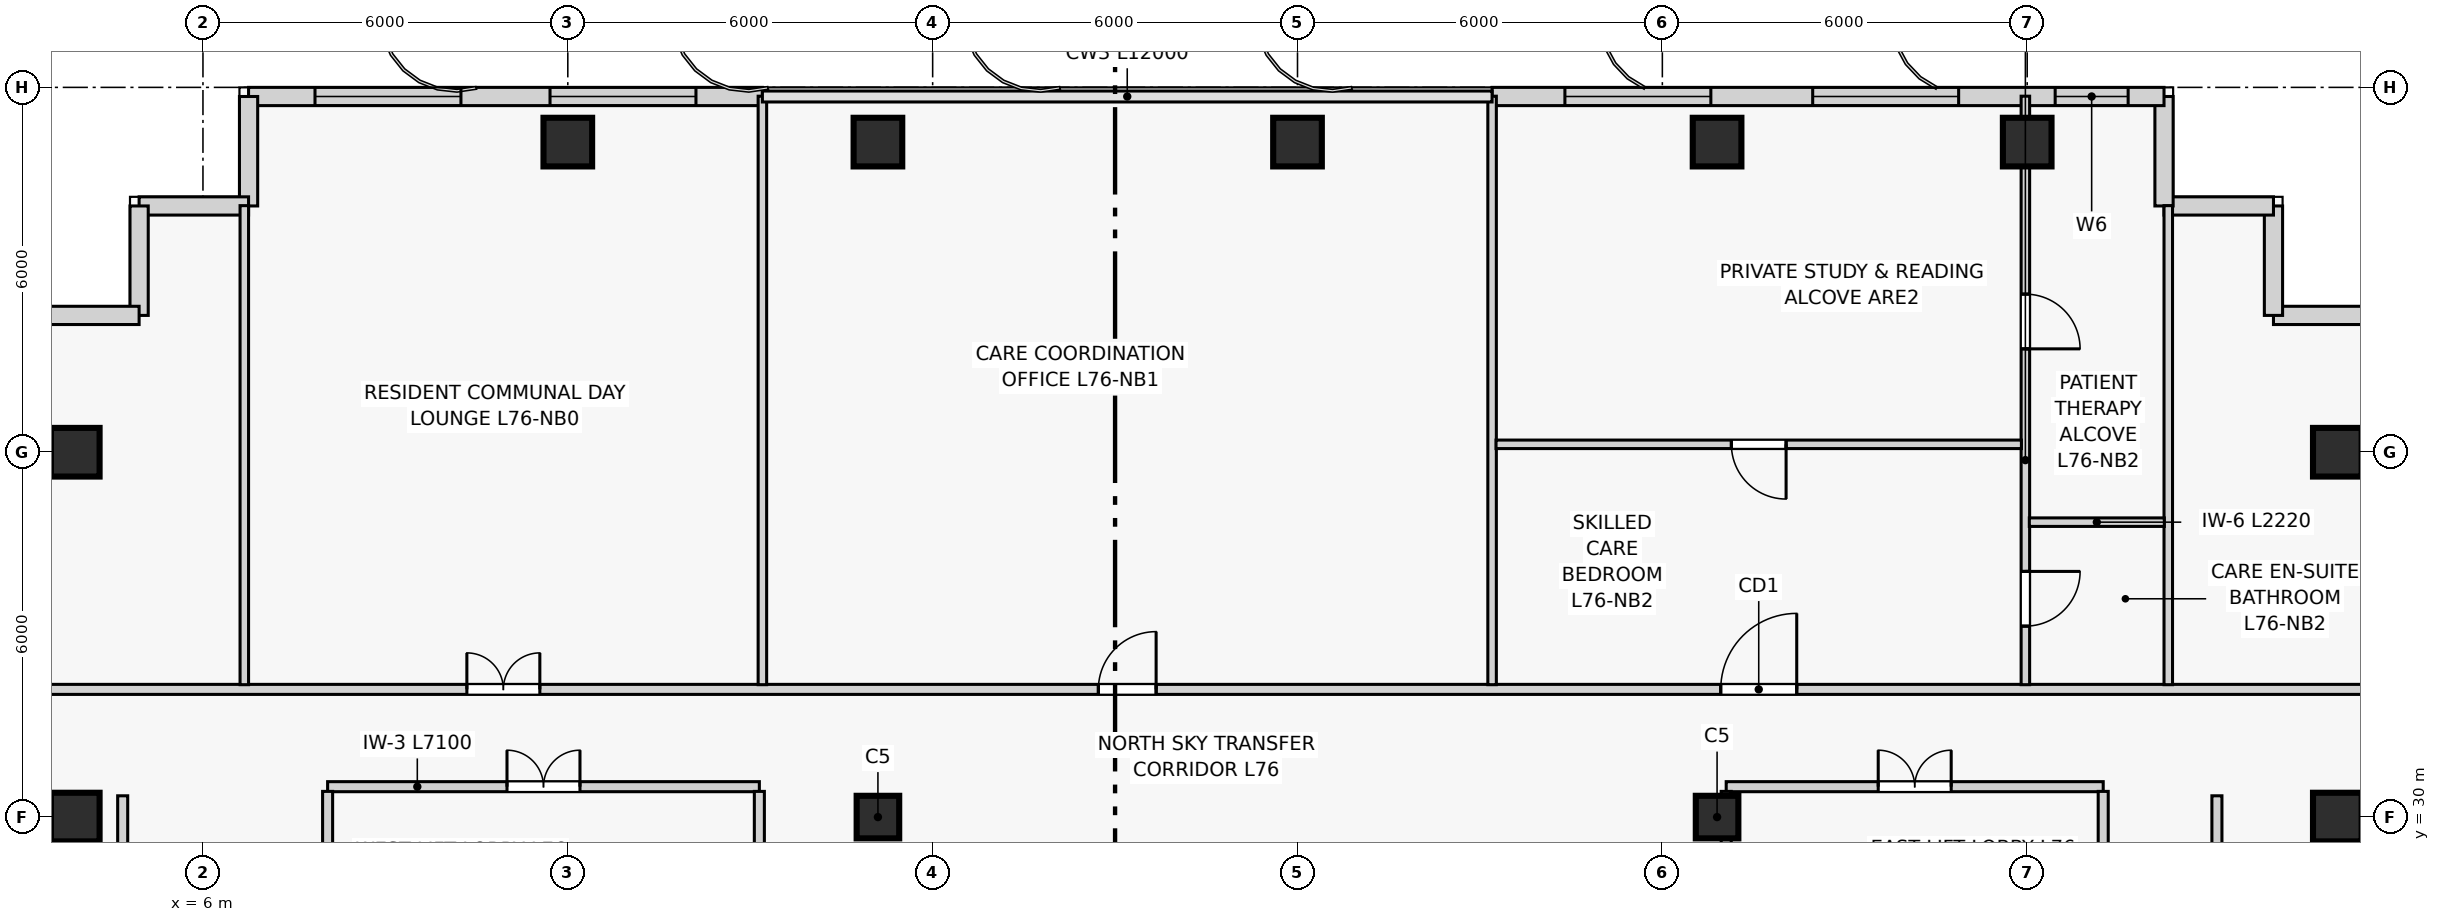
"""IFC4 building model, lengths in metres.
Left out: names, types, materials, properties, quantities, classifications, styles, units other than length and angle.
Written with IfcOpenShell. Run it as: python <this file> out.ifc"""

import sys

from ifc_helpers import new_model, si_unit, direction, frame, frame_2d, origin, origin_2d, place, context, subcontext, project, spatial, rectangle, extrude, source, transform, mapped, element, fill, save


model = new_model("IFC4")
c1 = context("Model", 3, precision=1e-05, world=origin(), true_north=direction((0.0, 1.0)))
c2 = subcontext(c1, "Body", "Model", "MODEL_VIEW")
j1 = project(units=[si_unit("LENGTHUNIT", "METRE"), si_unit("PLANEANGLEUNIT", "RADIAN")], contexts=[c1])
p1 = place(None, origin())
s1 = spatial("IfcSite", under=j1, at=p1, CompositionType="ELEMENT")
p2 = place(p1, origin())
s2 = spatial("IfcBuilding", under=s1, at=p2, CompositionType="ELEMENT")
p3 = place(p2, frame((0.0, 0.0, 289.5)))
s3 = spatial("IfcBuildingStorey", under=s2, at=p3, CompositionType="ELEMENT", Elevation=289.5)
m1 = source(origin(), c2, "Body", "SweptSolid", [
    extrude(rectangle(XDim=0.8, YDim=0.8, at=origin_2d()), origin(), (0.0, 0.0, 1.0), 4.2),
])
for number, where, z_axis, x_axis in (
    (1, (12.0, 41.1, 0.0), (0.0, 0.0, 1.0), (1.0, 0.0, 0.0)),
    (2, (17.1, 41.1, 0.0), (0.0, 0.0, 1.0), (1.0, 0.0, 0.0)),
    (3, (24.0, 41.1, 0.0), (0.0, 0.0, 1.0), (1.0, 0.0, 0.0)),
    (4, (30.9, 41.1, 0.0), (0.0, 0.0, 1.0), (1.0, 0.0, 0.0)),
    (5, (36.0, 41.1, 0.0), (0.0, 0.0, 1.0), (1.0, 0.0, 0.0)),
    (6, (3.9, 30.0, 0.0), (0.0, 0.0, 1.0), (1.0, 0.0, 0.0)),
    (7, (41.1, 30.0, 0.0), (0.0, 0.0, 1.0), (1.0, 0.0, 0.0)),
    (8, (3.9, 36.0, 0.0), (0.0, 0.0, 1.0), (1.0, 0.0, 0.0)),
    (9, (41.1, 36.0, 0.0), (0.0, 0.0, 1.0), (1.0, 0.0, 0.0)),
):
    element("IfcColumn", number, at=place(p3, frame(where, z_axis=z_axis, x_axis=x_axis)), inside=s3, PredefinedType="COLUMN", context=c2, shape_type="MappedRepresentation", body=[
        mapped(m1, transform((0.0, 0.0, 0.0), scale=1.0)),
    ])
m2 = source(origin(), c2, "Body", "SweptSolid", [
    extrude(rectangle(XDim=0.7, YDim=0.7, at=origin_2d()), origin(), (0.0, 0.0, 1.0), 4.2),
])
for number, where, z_axis, x_axis in (
    (10, (17.1, 30.0, 0.0), (0.0, 0.0, 1.0), (1.0, 0.0, 0.0)),
    (11, (30.9, 30.0, 0.0), (0.0, 0.0, 1.0), (1.0, 0.0, 0.0)),
):
    element("IfcColumn", number, at=place(p3, frame(where, z_axis=z_axis, x_axis=x_axis)), inside=s3, PredefinedType="COLUMN", context=c2, shape_type="MappedRepresentation", body=[
        mapped(m2, transform((0.0, 0.0, 0.0), scale=1.0)),
    ])
for number, where, z_axis, x_axis in (
    (12, (41.85, 38.25, 0.0), (0.0, 0.0, 1.0), (-1.0, 0.0, 0.0)),
    (13, (40.05, 38.25, 0.0), (0.0, 0.0, 1.0), (0.0, 1.0, 0.0)),
    (14, (40.05, 40.05, 0.0), (0.0, 0.0, 1.0), (-1.0, 0.0, 0.0)),
    (15, (38.25, 40.05, 0.0), (0.0, 0.0, 1.0), (0.0, 1.0, 0.0)),
):
    element("IfcWall", number, at=place(p3, frame(where, z_axis=z_axis, x_axis=x_axis)), inside=s3, PredefinedType="SOLIDWALL", context=c2, shape_type="SweptSolid", body=[
        extrude(rectangle(XDim=1.8, YDim=0.3, at=frame_2d((0.9, 0.0))), origin(), (0.0, 0.0, 1.0), 3.92),
    ])
p4 = place(p3, frame((38.25, 41.85, 0.0), z_axis=(0.0, 0.0, 1.0), x_axis=(-1.0, 0.0, 0.0)))
e16 = element("IfcWall", 16, at=p4, inside=s3, PredefinedType="SOLIDWALL", context=c2, shape_type="SweptSolid", body=[
    extrude(rectangle(XDim=11.05, YDim=0.3, at=frame_2d((5.525, 0.0))), origin(), (0.0, 0.0, 1.0), 3.92),
])
p5 = place(p4, frame((0.59, 0.0, 0.95)))
e17 = element("IfcOpeningElement", 17, at=p5, cuts=e16, PredefinedType="OPENING", context=c2, shape_type="SweptSolid", body=[
    extrude(rectangle(XDim=1.2, YDim=1.5, at=frame_2d((0.6, 0.75))), frame((0.0, 0.16, 0.0), z_axis=(0.0, -1.0, 0.0), x_axis=(1.0, 0.0, 0.0)), (0.0, 0.0, 1.0), 0.32),
])
p6 = place(p4, frame((3.377, 0.0, 0.8)))
e18 = element("IfcOpeningElement", 18, at=p6, cuts=e16, PredefinedType="OPENING", context=c2, shape_type="SweptSolid", body=[
    extrude(rectangle(XDim=2.4, YDim=2.1, at=frame_2d((1.2, 1.05))), frame((0.0, 0.16, 0.0), z_axis=(0.0, -1.0, 0.0), x_axis=(1.0, 0.0, 0.0)), (0.0, 0.0, 1.0), 0.32),
])
p7 = place(p4, frame((7.452, 0.0, 0.8)))
e19 = element("IfcOpeningElement", 19, at=p7, cuts=e16, PredefinedType="OPENING", context=c2, shape_type="SweptSolid", body=[
    extrude(rectangle(XDim=2.4, YDim=2.1, at=frame_2d((1.2, 1.05))), frame((0.0, 0.16, 0.0), z_axis=(0.0, -1.0, 0.0), x_axis=(1.0, 0.0, 0.0)), (0.0, 0.0, 1.0), 0.32),
])
p8 = place(p3, frame((15.2, 41.85, 0.0), z_axis=(0.0, 0.0, 1.0), x_axis=(-1.0, 0.0, 0.0)))
e20 = element("IfcWall", 20, at=p8, inside=s3, PredefinedType="SOLIDWALL", context=c2, shape_type="SweptSolid", body=[
    extrude(rectangle(XDim=8.45, YDim=0.3, at=frame_2d((4.225, 0.0))), origin(), (0.0, 0.0, 1.0), 3.92),
])
p9 = place(p8, frame((1.093, 0.0, 0.8)))
e21 = element("IfcOpeningElement", 21, at=p9, cuts=e20, PredefinedType="OPENING", context=c2, shape_type="SweptSolid", body=[
    extrude(rectangle(XDim=2.4, YDim=2.1, at=frame_2d((1.2, 1.05))), frame((0.0, 0.16, 0.0), z_axis=(0.0, -1.0, 0.0), x_axis=(1.0, 0.0, 0.0)), (0.0, 0.0, 1.0), 0.32),
])
p10 = place(p8, frame((4.958, 0.0, 0.8)))
e22 = element("IfcOpeningElement", 22, at=p10, cuts=e20, PredefinedType="OPENING", context=c2, shape_type="SweptSolid", body=[
    extrude(rectangle(XDim=2.4, YDim=2.1, at=frame_2d((1.2, 1.05))), frame((0.0, 0.16, 0.0), z_axis=(0.0, -1.0, 0.0), x_axis=(1.0, 0.0, 0.0)), (0.0, 0.0, 1.0), 0.32),
])
for number, where, z_axis, x_axis in (
    (23, (6.75, 41.85, 0.0), (0.0, 0.0, 1.0), (0.0, -1.0, 0.0)),
    (24, (6.75, 40.05, 0.0), (0.0, 0.0, 1.0), (-1.0, 0.0, 0.0)),
    (25, (4.95, 40.05, 0.0), (0.0, 0.0, 1.0), (0.0, -1.0, 0.0)),
    (26, (4.95, 38.25, 0.0), (0.0, 0.0, 1.0), (-1.0, 0.0, 0.0)),
):
    element("IfcWall", number, at=place(p3, frame(where, z_axis=z_axis, x_axis=x_axis)), inside=s3, PredefinedType="SOLIDWALL", context=c2, shape_type="SweptSolid", body=[
        extrude(rectangle(XDim=1.8, YDim=0.3, at=frame_2d((0.9, 0.0))), origin(), (0.0, 0.0, 1.0), 3.92),
    ])
p11 = place(p3, frame((8.05, 30.5, 0.0), z_axis=(0.0, 0.0, 1.0), x_axis=(1.0, 0.0, 0.0)))
e27 = element("IfcWall", 27, at=p11, inside=s3, PredefinedType="PARTITIONING", context=c2, shape_type="SweptSolid", body=[
    extrude(rectangle(XDim=7.1, YDim=0.165, at=frame_2d((3.55, 0.0))), origin(), (0.0, 0.0, 1.0), 3.92),
])
p12 = place(p11, frame((2.95, 0.0, 0.0)))
e28 = element("IfcOpeningElement", 28, at=p12, cuts=e27, PredefinedType="OPENING", context=c2, shape_type="SweptSolid", body=[
    extrude(rectangle(XDim=1.2, YDim=2.2, at=frame_2d((0.6, 1.1))), frame((0.0, 0.093, 0.0), z_axis=(0.0, -1.0, 0.0), x_axis=(1.0, 0.0, 0.0)), (0.0, 0.0, 1.0), 0.185),
])
for number, where, z_axis, x_axis in (
    (29, (8.05, 27.27, 0.0), (0.0, 0.0, 1.0), (0.0, 1.0, 0.0)),
    (30, (15.15, 27.27, 0.0), (0.0, 0.0, 1.0), (0.0, 1.0, 0.0)),
):
    element("IfcWall", number, at=place(p3, frame(where, z_axis=z_axis, x_axis=x_axis)), inside=s3, PredefinedType="PARTITIONING", context=c2, shape_type="SweptSolid", body=[
        extrude(rectangle(XDim=3.153, YDim=0.165, at=frame_2d((1.576, 0.0))), origin(), (0.0, 0.0, 1.0), 3.92),
    ])
p13 = place(p3, frame((31.05, 30.5, 0.0), z_axis=(0.0, 0.0, 1.0), x_axis=(1.0, 0.0, 0.0)))
e31 = element("IfcWall", 31, at=p13, inside=s3, PredefinedType="PARTITIONING", context=c2, shape_type="SweptSolid", body=[
    extrude(rectangle(XDim=6.2, YDim=0.165, at=frame_2d((3.1, 0.0))), origin(), (0.0, 0.0, 1.0), 3.92),
])
p14 = place(p13, frame((2.5, 0.0, 0.0)))
e32 = element("IfcOpeningElement", 32, at=p14, cuts=e31, PredefinedType="OPENING", context=c2, shape_type="SweptSolid", body=[
    extrude(rectangle(XDim=1.2, YDim=2.2, at=frame_2d((0.6, 1.1))), frame((0.0, 0.093, 0.0), z_axis=(0.0, -1.0, 0.0), x_axis=(1.0, 0.0, 0.0)), (0.0, 0.0, 1.0), 0.185),
])
for number, where, z_axis, x_axis in (
    (33, (31.05, 27.27, 0.0), (0.0, 0.0, 1.0), (0.0, 1.0, 0.0)),
    (34, (37.25, 27.27, 0.0), (0.0, 0.0, 1.0), (0.0, 1.0, 0.0)),
):
    element("IfcWall", number, at=place(p3, frame(where, z_axis=z_axis, x_axis=x_axis)), inside=s3, PredefinedType="PARTITIONING", context=c2, shape_type="SweptSolid", body=[
        extrude(rectangle(XDim=3.153, YDim=0.165, at=frame_2d((1.576, 0.0))), origin(), (0.0, 0.0, 1.0), 3.92),
    ])
p15 = place(p3, frame((3.145, 32.1, 0.0), z_axis=(0.0, 0.0, 1.0), x_axis=(1.0, 0.0, 0.0)))
e35 = element("IfcWall", 35, at=p15, inside=s3, PredefinedType="PARTITIONING", context=c2, shape_type="SweptSolid", body=[
    extrude(rectangle(XDim=38.71, YDim=0.165, at=frame_2d((19.355, 0.0))), origin(), (0.0, 0.0, 1.0), 3.92),
])
p16 = place(p15, frame((7.195, 0.0, 0.0)))
e36 = element("IfcOpeningElement", 36, at=p16, cuts=e35, PredefinedType="OPENING", context=c2, shape_type="SweptSolid", body=[
    extrude(rectangle(XDim=1.2, YDim=2.2, at=frame_2d((0.6, 1.1))), frame((0.0, 0.093, 0.0), z_axis=(0.0, -1.0, 0.0), x_axis=(1.0, 0.0, 0.0)), (0.0, 0.0, 1.0), 0.185),
])
p17 = place(p15, frame((17.58, 0.0, 0.0)))
e37 = element("IfcOpeningElement", 37, at=p17, cuts=e35, PredefinedType="OPENING", context=c2, shape_type="SweptSolid", body=[
    extrude(rectangle(XDim=0.95, YDim=2.1, at=frame_2d((0.475, 1.05))), frame((0.0, 0.093, 0.0), z_axis=(0.0, -1.0, 0.0), x_axis=(1.0, 0.0, 0.0)), (0.0, 0.0, 1.0), 0.185),
])
p18 = place(p15, frame((27.815, 0.0, 0.0)))
e38 = element("IfcOpeningElement", 38, at=p18, cuts=e35, PredefinedType="OPENING", context=c2, shape_type="SweptSolid", body=[
    extrude(rectangle(XDim=1.25, YDim=2.2, at=frame_2d((0.625, 1.1))), frame((0.0, 0.093, 0.0), z_axis=(0.0, -1.0, 0.0), x_axis=(1.0, 0.0, 0.0)), (0.0, 0.0, 1.0), 0.185),
])
p19 = place(p3, frame((4.68, 26.45, 0.0), z_axis=(0.0, 0.0, 1.0), x_axis=(0.0, 1.0, 0.0)))
e39 = element("IfcWall", 39, at=p19, inside=s3, PredefinedType="PARTITIONING", context=c2, shape_type="SweptSolid", body=[
    extrude(rectangle(XDim=3.9, YDim=0.165, at=frame_2d((1.95, 0.0))), origin(), (0.0, 0.0, 1.0), 3.92),
])
p20 = place(p19, frame((1.475, 0.0, 0.0)))
e40 = element("IfcOpeningElement", 40, at=p20, cuts=e39, PredefinedType="OPENING", context=c2, shape_type="SweptSolid", body=[
    extrude(rectangle(XDim=0.95, YDim=2.1, at=frame_2d((0.475, 1.05))), frame((0.0, 0.093, 0.0), z_axis=(0.0, -1.0, 0.0), x_axis=(1.0, 0.0, 0.0)), (0.0, 0.0, 1.0), 0.185),
])
p21 = place(p3, frame((39.12, 11.45, 0.0), z_axis=(0.0, 0.0, 1.0), x_axis=(0.0, 1.0, 0.0)))
e41 = element("IfcWall", 41, at=p21, inside=s3, PredefinedType="PARTITIONING", context=c2, shape_type="SweptSolid", body=[
    extrude(rectangle(XDim=18.9, YDim=0.165, at=frame_2d((9.45, 0.0))), origin(), (0.0, 0.0, 1.0), 3.92),
])
p22 = place(p21, frame((2.05, 0.0, 0.0)))
e42 = element("IfcOpeningElement", 42, at=p22, cuts=e41, PredefinedType="OPENING", context=c2, shape_type="SweptSolid", body=[
    extrude(rectangle(XDim=0.95, YDim=2.1, at=frame_2d((0.475, 1.05))), frame((0.0, 0.093, 0.0), z_axis=(0.0, -1.0, 0.0), x_axis=(1.0, 0.0, 0.0)), (0.0, 0.0, 1.0), 0.185),
])
p23 = place(p3, frame((6.68, 32.177, 0.0), z_axis=(0.0, 0.0, 1.0), x_axis=(0.0, 1.0, 0.0)))
e43 = element("IfcWall", 43, at=p23, inside=s3, PredefinedType="PARTITIONING", context=c2, shape_type="SweptSolid", body=[
    extrude(rectangle(XDim=7.877, YDim=0.14, at=frame_2d((3.939, 0.0))), origin(), (0.0, 0.0, 1.0), 3.92),
])
for number, where, z_axis, x_axis in (
    (44, (15.2, 32.177, 0.0), (0.0, 0.0, 1.0), (0.0, 1.0, 0.0)),
    (45, (27.2, 32.177, 0.0), (0.0, 0.0, 1.0), (0.0, 1.0, 0.0)),
):
    element("IfcWall", number, at=place(p3, frame(where, z_axis=z_axis, x_axis=x_axis)), inside=s3, PredefinedType="PARTITIONING", context=c2, shape_type="SweptSolid", body=[
        extrude(rectangle(XDim=9.677, YDim=0.14, at=frame_2d((4.839, 0.0))), origin(), (0.0, 0.0, 1.0), 3.92),
    ])
p24 = place(p3, frame((38.32, 32.177, 0.0), z_axis=(0.0, 0.0, 1.0), x_axis=(0.0, 1.0, 0.0)))
e46 = element("IfcWall", 46, at=p24, inside=s3, PredefinedType="PARTITIONING", context=c2, shape_type="SweptSolid", body=[
    extrude(rectangle(XDim=7.877, YDim=0.14, at=frame_2d((3.939, 0.0))), origin(), (0.0, 0.0, 1.0), 3.92),
])
p25 = place(p3, frame((35.97, 32.177, 0.0), z_axis=(0.0, 0.0, 1.0), x_axis=(0.0, 1.0, 0.0)))
e47 = element("IfcWall", 47, at=p25, inside=s3, PredefinedType="PLUMBINGWALL", context=c2, shape_type="SweptSolid", body=[
    extrude(rectangle(XDim=9.677, YDim=0.14, at=frame_2d((4.839, 0.0))), origin(), (0.0, 0.0, 1.0), 3.07),
])
p26 = place(p25, frame((0.962, 0.0, 0.0)))
e48 = element("IfcOpeningElement", 48, at=p26, cuts=e47, PredefinedType="OPENING", context=c2, shape_type="SweptSolid", body=[
    extrude(rectangle(XDim=0.9, YDim=2.1, at=frame_2d((0.45, 1.05))), frame((0.0, 0.08, 0.0), z_axis=(0.0, -1.0, 0.0), x_axis=(1.0, 0.0, 0.0)), (0.0, 0.0, 1.0), 0.16),
])
p27 = place(p25, frame((5.522, 0.0, 0.0)))
e49 = element("IfcOpeningElement", 49, at=p27, cuts=e47, PredefinedType="OPENING", context=c2, shape_type="SweptSolid", body=[
    extrude(rectangle(XDim=0.9, YDim=2.1, at=frame_2d((0.45, 1.05))), frame((0.0, 0.08, 0.0), z_axis=(0.0, -1.0, 0.0), x_axis=(1.0, 0.0, 0.0)), (0.0, 0.0, 1.0), 0.16),
])
p28 = place(p3, frame((36.035, 34.85, 0.0), z_axis=(0.0, 0.0, 1.0), x_axis=(1.0, 0.0, 0.0)))
e50 = element("IfcWall", 50, at=p28, inside=s3, PredefinedType="PLUMBINGWALL", context=c2, shape_type="SweptSolid", body=[
    extrude(rectangle(XDim=2.22, YDim=0.14, at=frame_2d((1.11, 0.0))), origin(), (0.0, 0.0, 1.0), 3.92),
])
p29 = place(p3, frame((27.265, 36.13, 0.0), z_axis=(0.0, 0.0, 1.0), x_axis=(1.0, 0.0, 0.0)))
e51 = element("IfcWall", 51, at=p29, inside=s3, PredefinedType="PARTITIONING", context=c2, shape_type="SweptSolid", body=[
    extrude(rectangle(XDim=8.64, YDim=0.14, at=frame_2d((4.32, 0.0))), origin(), (0.0, 0.0, 1.0), 3.52),
])
p30 = place(p29, frame((3.87, 0.0, 0.0)))
e52 = element("IfcOpeningElement", 52, at=p30, cuts=e51, PredefinedType="OPENING", context=c2, shape_type="SweptSolid", body=[
    extrude(rectangle(XDim=0.9, YDim=2.1, at=frame_2d((0.45, 1.05))), frame((0.0, 0.08, 0.0), z_axis=(0.0, -1.0, 0.0), x_axis=(1.0, 0.0, 0.0)), (0.0, 0.0, 1.0), 0.16),
])
m3 = source(origin(), c2, "Body", "SweptSolid", [
    extrude(rectangle(XDim=1.2, YDim=1.5, at=frame_2d((0.6, 0.75))), frame((0.0, 0.03, 0.0), z_axis=(0.0, -1.0, 0.0), x_axis=(1.0, 0.0, 0.0)), (0.0, 0.0, 1.0), 0.06),
])
p31 = place(p5, origin())
e53 = element("IfcWindow", 53, at=p31, inside=s3, PartitioningType="SINGLE_PANEL", PredefinedType="WINDOW", context=c2, shape_type="MappedRepresentation", body=[
    mapped(m3, transform((0.0, 0.0, 0.0), scale=1.0)),
])
fill(e17, e53)
m4 = source(origin(), c2, "Body", "SweptSolid", [
    extrude(rectangle(XDim=2.4, YDim=2.1, at=frame_2d((1.2, 1.05))), frame((0.0, 0.03, 0.0), z_axis=(0.0, -1.0, 0.0), x_axis=(1.0, 0.0, 0.0)), (0.0, 0.0, 1.0), 0.06),
])
p32 = place(p6, origin())
e54 = element("IfcWindow", 54, at=p32, inside=s3, PartitioningType="SINGLE_PANEL", PredefinedType="WINDOW", context=c2, shape_type="MappedRepresentation", body=[
    mapped(m4, transform((0.0, 0.0, 0.0), scale=1.0)),
])
fill(e18, e54)
p33 = place(p7, origin())
e55 = element("IfcWindow", 55, at=p33, inside=s3, PartitioningType="SINGLE_PANEL", PredefinedType="WINDOW", context=c2, shape_type="MappedRepresentation", body=[
    mapped(m4, transform((0.0, 0.0, 0.0), scale=1.0)),
])
fill(e19, e55)
p34 = place(p9, origin())
e56 = element("IfcWindow", 56, at=p34, inside=s3, PartitioningType="SINGLE_PANEL", PredefinedType="WINDOW", context=c2, shape_type="MappedRepresentation", body=[
    mapped(m4, transform((0.0, 0.0, 0.0), scale=1.0)),
])
fill(e21, e56)
p35 = place(p10, origin())
e57 = element("IfcWindow", 57, at=p35, inside=s3, PartitioningType="SINGLE_PANEL", PredefinedType="WINDOW", context=c2, shape_type="MappedRepresentation", body=[
    mapped(m4, transform((0.0, 0.0, 0.0), scale=1.0)),
])
fill(e22, e57)
m5 = source(origin(), c2, "Body", "SweptSolid", [
    extrude(rectangle(XDim=1.2, YDim=2.2, at=frame_2d((0.6, 1.1))), frame((0.0, 0.025, 0.0), z_axis=(0.0, -1.0, 0.0), x_axis=(1.0, 0.0, 0.0)), (0.0, 0.0, 1.0), 0.05),
])
p36 = place(p12, origin())
e58 = element("IfcDoor", 58, at=p36, inside=s3, OperationType="DOUBLE_DOOR_SINGLE_SWING", PredefinedType="DOOR", context=c2, shape_type="MappedRepresentation", body=[
    mapped(m5, transform((0.0, 0.0, 0.0), scale=1.0)),
])
fill(e28, e58)
p37 = place(p14, origin())
e59 = element("IfcDoor", 59, at=p37, inside=s3, OperationType="DOUBLE_DOOR_SINGLE_SWING", PredefinedType="DOOR", context=c2, shape_type="MappedRepresentation", body=[
    mapped(m5, transform((0.0, 0.0, 0.0), scale=1.0)),
])
fill(e32, e59)
p38 = place(p16, origin())
e60 = element("IfcDoor", 60, at=p38, inside=s3, OperationType="DOUBLE_DOOR_SINGLE_SWING", PredefinedType="DOOR", context=c2, shape_type="MappedRepresentation", body=[
    mapped(m5, transform((0.0, 0.0, 0.0), scale=1.0)),
])
fill(e36, e60)
m6 = source(origin(), c2, "Body", "SweptSolid", [
    extrude(rectangle(XDim=0.95, YDim=2.1, at=frame_2d((0.475, 1.05))), frame((0.0, 0.025, 0.0), z_axis=(0.0, -1.0, 0.0), x_axis=(1.0, 0.0, 0.0)), (0.0, 0.0, 1.0), 0.05),
])
p39 = place(p17, origin())
e61 = element("IfcDoor", 61, at=p39, inside=s3, OperationType="SINGLE_SWING_RIGHT", PredefinedType="DOOR", context=c2, shape_type="MappedRepresentation", body=[
    mapped(m6, transform((0.0, 0.0, 0.0), scale=1.0)),
])
fill(e37, e61)
m7 = source(origin(), c2, "Body", "SweptSolid", [
    extrude(rectangle(XDim=1.25, YDim=2.2, at=frame_2d((0.625, 1.1))), frame((0.0, 0.025, 0.0), z_axis=(0.0, -1.0, 0.0), x_axis=(1.0, 0.0, 0.0)), (0.0, 0.0, 1.0), 0.05),
])
p40 = place(p18, origin())
e62 = element("IfcDoor", 62, at=p40, inside=s3, OperationType="SINGLE_SWING_RIGHT", PredefinedType="DOOR", context=c2, shape_type="MappedRepresentation", body=[
    mapped(m7, transform((0.0, 0.0, 0.0), scale=1.0)),
])
fill(e38, e62)
m8 = source(origin(), c2, "Body", "SweptSolid", [
    extrude(rectangle(XDim=0.9, YDim=2.1, at=frame_2d((0.45, 1.05))), frame((0.0, 0.025, 0.0), z_axis=(0.0, -1.0, 0.0), x_axis=(1.0, 0.0, 0.0)), (0.0, 0.0, 1.0), 0.05),
])
p41 = place(p26, frame((0.9, 0.0, 0.0), z_axis=(0.0, 0.0, 1.0), x_axis=(-1.0, 0.0, 0.0)))
e63 = element("IfcDoor", 63, at=p41, inside=s3, OperationType="SINGLE_SWING_LEFT", PredefinedType="DOOR", context=c2, shape_type="MappedRepresentation", body=[
    mapped(m8, transform((0.0, 0.0, 0.0), scale=1.0)),
])
fill(e48, e63)
p42 = place(p27, frame((0.9, 0.0, 0.0), z_axis=(0.0, 0.0, 1.0), x_axis=(-1.0, 0.0, 0.0)))
e64 = element("IfcDoor", 64, at=p42, inside=s3, OperationType="SINGLE_SWING_RIGHT", PredefinedType="DOOR", context=c2, shape_type="MappedRepresentation", body=[
    mapped(m8, transform((0.0, 0.0, 0.0), scale=1.0)),
])
fill(e49, e64)
p43 = place(p30, frame((0.9, 0.0, 0.0), z_axis=(0.0, 0.0, 1.0), x_axis=(-1.0, 0.0, 0.0)))
e65 = element("IfcDoor", 65, at=p43, inside=s3, OperationType="SINGLE_SWING_LEFT", PredefinedType="DOOR", context=c2, shape_type="MappedRepresentation", body=[
    mapped(m8, transform((0.0, 0.0, 0.0), scale=1.0)),
])
fill(e52, e65)
save(model, sys.argv[1])
